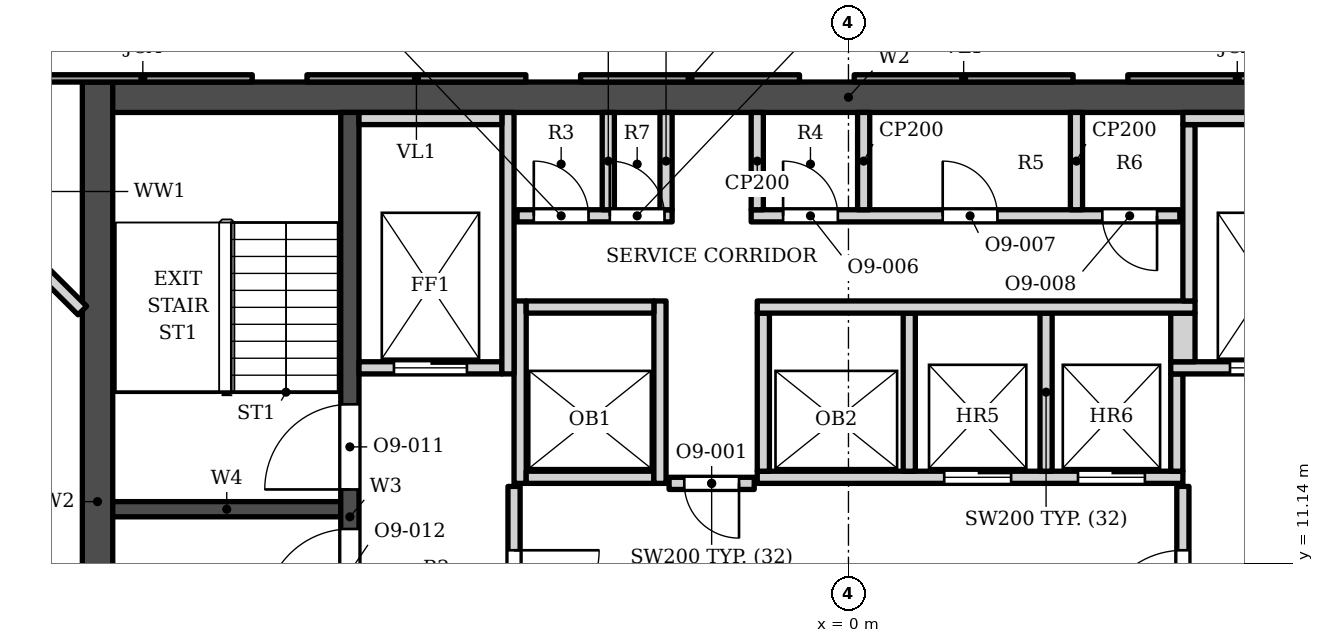
"""IFC4 building model, lengths in metres.
Left out: names, types, materials, properties, quantities, classifications, styles, units other than length and angle.
Written with IfcOpenShell. Run it as: python <this file> out.ifc"""

import sys

from ifc_helpers import new_model, si_unit, direction, frame, frame_2d, origin, place, context, subcontext, project, spatial, polyline, rectangle, outline, extrude, element, fill, save


model = new_model("IFC4")
c1 = context("Model", 3, precision=1e-05, world=origin(), true_north=direction((0.0, 1.0)))
c2 = subcontext(c1, "Body", "Model", "MODEL_VIEW")
j1 = project(units=[si_unit("LENGTHUNIT", "METRE"), si_unit("PLANEANGLEUNIT", "RADIAN")], contexts=[c1])
p1 = place(None, origin())
s1 = spatial("IfcSite", under=j1, at=p1, CompositionType="ELEMENT")
p2 = place(p1, origin())
s2 = spatial("IfcBuilding", under=s1, at=p2, CompositionType="ELEMENT")
p3 = place(p2, frame((0.0, 0.0, 248.2)))
s3 = spatial("IfcBuildingStorey", under=s2, at=p3, CompositionType="ELEMENT", Elevation=248.2)
p4 = place(p3, frame((-12.1, 18.802, 0.0), z_axis=(0.0, 0.0, 1.0), x_axis=(1.0, 0.0, 0.0)))
e1 = element("IfcWall", 1, at=p4, inside=s3, PredefinedType="SHEAR", context=c2, shape_type="SweptSolid", body=[
    extrude(rectangle(XDim=24.2, YDim=0.5, at=frame_2d((12.1, 0.0))), origin(), (0.0, 0.0, 1.0), 3.9),
])
p5 = place(p3, frame((-12.35, 5.253, 0.0), z_axis=(0.0, 0.0, 1.0), x_axis=(0.0, 1.0, 0.0)))
e2 = element("IfcWall", 2, at=p5, inside=s3, PredefinedType="SHEAR", context=c2, shape_type="SweptSolid", body=[
    extrude(rectangle(XDim=13.8, YDim=0.5, at=frame_2d((6.9, 0.0))), origin(), (0.0, 0.0, 1.0), 3.9),
])
p6 = place(p3, frame((-8.2, 5.253, 0.0), z_axis=(0.0, 0.0, 1.0), x_axis=(0.0, 1.0, 0.0)))
e3 = element("IfcWall", 3, at=p6, inside=s3, PredefinedType="SHEAR", context=c2, shape_type="SweptSolid", body=[
    extrude(rectangle(XDim=13.3, YDim=0.3, at=frame_2d((6.65, 0.0))), origin(), (0.0, 0.0, 1.0), 3.9),
])
p7 = place(p6, frame((7.1, 0.0, 0.0)))
e4 = element("IfcOpeningElement", 4, at=p7, cuts=e3, PredefinedType="OPENING", context=c2, shape_type="SweptSolid", body=[
    extrude(rectangle(XDim=1.4, YDim=2.1, at=frame_2d((0.7, 1.05))), frame((0.0, 0.16, 0.0), z_axis=(0.0, -1.0, 0.0), x_axis=(1.0, 0.0, 0.0)), (0.0, 0.0, 1.0), 0.32),
])
p8 = place(p6, frame((5.05, 0.0, 0.0)))
e5 = element("IfcOpeningElement", 5, at=p8, cuts=e3, PredefinedType="OPENING", context=c2, shape_type="SweptSolid", body=[
    extrude(rectangle(XDim=1.4, YDim=2.1, at=frame_2d((0.7, 1.05))), frame((0.0, 0.16, 0.0), z_axis=(0.0, -1.0, 0.0), x_axis=(1.0, 0.0, 0.0)), (0.0, 0.0, 1.0), 0.32),
])
p9 = place(p3, frame((-12.1, 12.028, 0.0), z_axis=(0.0, 0.0, 1.0), x_axis=(1.0, 0.0, 0.0)))
e6 = element("IfcWall", 6, at=p9, inside=s3, PredefinedType="SHEAR", context=c2, shape_type="SweptSolid", body=[
    extrude(rectangle(XDim=3.75, YDim=0.25, at=frame_2d((1.875, 0.0))), origin(), (0.0, 0.0, 1.0), 3.9),
])
p10 = place(p3, origin())
e7 = element("IfcWall", 7, at=p10, inside=s3, PredefinedType="SOLIDWALL", context=c2, shape_type="SweptSolid", body=[
    extrude(outline(polyline([(4.594, 19.173), (4.594, 19.052), (8.195, 19.052), (8.195, 19.173), (4.594, 19.173)])), origin(), (0.0, 0.0, 1.0), 3.0),
])
p11 = place(p3, origin())
e8 = element("IfcWall", 8, at=p11, inside=s3, PredefinedType="ELEMENTEDWALL", context=c2, shape_type="SweptSolid", body=[
    extrude(outline(polyline([(0.094, 19.173), (0.094, 19.052), (3.695, 19.052), (3.695, 19.173), (0.094, 19.173)])), origin(), (0.0, 0.0, 1.0), 3.0),
])
p12 = place(p3, origin())
e9 = element("IfcWall", 9, at=p12, inside=s3, PredefinedType="SOLIDWALL", context=c2, shape_type="SweptSolid", body=[
    extrude(outline(polyline([(-4.406, 19.173), (-4.406, 19.052), (-0.805, 19.052), (-0.805, 19.173), (-4.406, 19.173)])), origin(), (0.0, 0.0, 1.0), 3.0),
])
p13 = place(p3, origin())
e10 = element("IfcWall", 10, at=p13, inside=s3, PredefinedType="ELEMENTEDWALL", context=c2, shape_type="SweptSolid", body=[
    extrude(outline(polyline([(-8.906, 19.173), (-8.906, 19.052), (-5.305, 19.052), (-5.305, 19.173), (-8.906, 19.173)])), origin(), (0.0, 0.0, 1.0), 3.0),
])
p14 = place(p3, origin())
e11 = element("IfcWall", 11, at=p14, inside=s3, PredefinedType="SOLIDWALL", context=c2, shape_type="SweptSolid", body=[
    extrude(outline(polyline([(-13.405, 19.173), (-13.405, 19.052), (-9.805, 19.052), (-9.805, 19.173), (-13.405, 19.173)])), origin(), (0.0, 0.0, 1.0), 3.0),
])
p15 = place(p3, frame((-5.5, 9.103, 0.0), z_axis=(0.0, 0.0, 1.0), x_axis=(0.0, 1.0, 0.0)))
e12 = element("IfcWall", 12, at=p15, inside=s3, PredefinedType="SOLIDWALL", context=c2, shape_type="SweptSolid", body=[
    extrude(rectangle(XDim=3.3, YDim=0.2, at=frame_2d((1.65, 0.0))), origin(), (0.0, 0.0, 1.0), 3.73),
])
p16 = place(p15, frame((0.85, 0.0, 0.0)))
e13 = element("IfcOpeningElement", 13, at=p16, cuts=e12, PredefinedType="OPENING", context=c2, shape_type="SweptSolid", body=[
    extrude(rectangle(XDim=1.4, YDim=2.1, at=frame_2d((0.7, 1.05))), frame((0.0, 0.11, 0.0), z_axis=(0.0, -1.0, 0.0), x_axis=(1.0, 0.0, 0.0)), (0.0, 0.0, 1.0), 0.22),
])
p17 = place(p3, frame((5.5, 9.103, 0.0), z_axis=(0.0, 0.0, 1.0), x_axis=(0.0, 1.0, 0.0)))
e14 = element("IfcWall", 14, at=p17, inside=s3, PredefinedType="SOLIDWALL", context=c2, shape_type="SweptSolid", body=[
    extrude(rectangle(XDim=3.3, YDim=0.2, at=frame_2d((1.65, 0.0))), origin(), (0.0, 0.0, 1.0), 3.73),
])
p18 = place(p17, frame((0.85, 0.0, 0.0)))
e15 = element("IfcOpeningElement", 15, at=p18, cuts=e14, PredefinedType="OPENING", context=c2, shape_type="SweptSolid", body=[
    extrude(rectangle(XDim=1.4, YDim=2.1, at=frame_2d((0.7, 1.05))), frame((0.0, 0.11, 0.0), z_axis=(0.0, -1.0, 0.0), x_axis=(1.0, 0.0, 0.0)), (0.0, 0.0, 1.0), 0.22),
])
p19 = place(p3, frame((-2.95, 12.453, 0.0), z_axis=(0.0, 0.0, 1.0), x_axis=(1.0, 0.0, 0.0)))
e16 = element("IfcWall", 16, at=p19, inside=s3, PredefinedType="SOLIDWALL", context=c2, shape_type="SweptSolid", body=[
    extrude(rectangle(XDim=1.4, YDim=0.2, at=frame_2d((0.7, 0.0))), origin(), (0.0, 0.0, 1.0), 3.73),
])
p20 = place(p19, frame((0.25, 0.0, 0.0)))
e17 = element("IfcOpeningElement", 17, at=p20, cuts=e16, PredefinedType="OPENING", context=c2, shape_type="SweptSolid", body=[
    extrude(rectangle(XDim=0.9, YDim=2.1, at=frame_2d((0.45, 1.05))), frame((0.0, 0.11, 0.0), z_axis=(0.0, -1.0, 0.0), x_axis=(1.0, 0.0, 0.0)), (0.0, 0.0, 1.0), 0.22),
])
p21 = place(p3, frame((-5.4, 12.453, 0.0), z_axis=(0.0, 0.0, 1.0), x_axis=(0.0, 1.0, 0.0)))
e18 = element("IfcWall", 18, at=p21, inside=s3, PredefinedType="SOLIDWALL", context=c2, shape_type="SweptSolid", body=[
    extrude(rectangle(XDim=3.0, YDim=0.2, at=frame_2d((1.5, 0.0))), origin(), (0.0, 0.0, 1.0), 3.73),
])
p22 = place(p3, frame((-5.3, 12.552, 0.0), z_axis=(0.0, 0.0, 1.0), x_axis=(1.0, 0.0, 0.0)))
e19 = element("IfcWall", 19, at=p22, inside=s3, PredefinedType="SOLIDWALL", context=c2, shape_type="SweptSolid", body=[
    extrude(rectangle(XDim=2.1, YDim=0.2, at=frame_2d((1.05, 0.0))), origin(), (0.0, 0.0, 1.0), 3.73),
])
p23 = place(p3, frame((-3.1, 12.453, 0.0), z_axis=(0.0, 0.0, 1.0), x_axis=(0.0, 1.0, 0.0)))
e20 = element("IfcWall", 20, at=p23, inside=s3, PredefinedType="SOLIDWALL", context=c2, shape_type="SweptSolid", body=[
    extrude(rectangle(XDim=3.0, YDim=0.2, at=frame_2d((1.5, 0.0))), origin(), (0.0, 0.0, 1.0), 3.73),
])
p24 = place(p3, frame((-1.5, 12.552, 0.0), z_axis=(0.0, 0.0, 1.0), x_axis=(1.0, 0.0, 0.0)))
e21 = element("IfcWall", 21, at=p24, inside=s3, PredefinedType="SOLIDWALL", context=c2, shape_type="SweptSolid", body=[
    extrude(rectangle(XDim=7.0, YDim=0.2, at=frame_2d((3.5, 0.0))), origin(), (0.0, 0.0, 1.0), 3.73),
])
p25 = place(p24, frame((3.075, 0.0, 0.0)))
e22 = element("IfcOpeningElement", 22, at=p25, cuts=e21, PredefinedType="OPENING", context=c2, shape_type="SweptSolid", body=[
    extrude(rectangle(XDim=1.1, YDim=2.1, at=frame_2d((0.55, 1.05))), frame((0.0, 0.11, 0.0), z_axis=(0.0, -1.0, 0.0), x_axis=(1.0, 0.0, 0.0)), (0.0, 0.0, 1.0), 0.22),
])
p26 = place(p24, frame((5.275, 0.0, 0.0)))
e23 = element("IfcOpeningElement", 23, at=p26, cuts=e21, PredefinedType="OPENING", context=c2, shape_type="SweptSolid", body=[
    extrude(rectangle(XDim=1.1, YDim=2.1, at=frame_2d((0.55, 1.05))), frame((0.0, 0.11, 0.0), z_axis=(0.0, -1.0, 0.0), x_axis=(1.0, 0.0, 0.0)), (0.0, 0.0, 1.0), 0.22),
])
for number, where, z_axis, x_axis in (
    (24, (-1.4, 12.653, 0.0), (0.0, 0.0, 1.0), (0.0, 1.0, 0.0)),
    (25, (1.0, 12.653, 0.0), (0.0, 0.0, 1.0), (0.0, 1.0, 0.0)),
    (26, (3.25, 12.653, 0.0), (0.0, 0.0, 1.0), (0.0, 1.0, 0.0)),
):
    element("IfcWall", number, at=place(p3, frame(where, z_axis=z_axis, x_axis=x_axis)), inside=s3, PredefinedType="SOLIDWALL", context=c2, shape_type="SweptSolid", body=[
        extrude(rectangle(XDim=2.6, YDim=0.2, at=frame_2d((1.3, 0.0))), origin(), (0.0, 0.0, 1.0), 3.73),
    ])
p27 = place(p3, frame((5.4, 12.653, 0.0), z_axis=(0.0, 0.0, 1.0), x_axis=(0.0, 1.0, 0.0)))
e27 = element("IfcWall", 27, at=p27, inside=s3, PredefinedType="SOLIDWALL", context=c2, shape_type="SweptSolid", body=[
    extrude(rectangle(XDim=1.6, YDim=0.2, at=frame_2d((0.8, 0.0))), origin(), (0.0, 0.0, 1.0), 3.73),
])
p28 = place(p3, frame((-8.05, 14.353, 0.0), z_axis=(0.0, 0.0, 1.0), x_axis=(1.0, 0.0, 0.0)))
e28 = element("IfcWall", 28, at=p28, inside=s3, PredefinedType="SOLIDWALL", context=c2, shape_type="SweptSolid", body=[
    extrude(rectangle(XDim=2.35, YDim=0.2, at=frame_2d((1.175, 0.0))), origin(), (0.0, 0.0, 1.0), 3.73),
])
p29 = place(p28, frame((0.575, 0.0, 0.0)))
e29 = element("IfcOpeningElement", 29, at=p29, cuts=e28, PredefinedType="OPENING", context=c2, shape_type="SweptSolid", body=[
    extrude(rectangle(XDim=1.2, YDim=2.1, at=frame_2d((0.6, 1.05))), frame((0.0, 0.11, 0.0), z_axis=(0.0, -1.0, 0.0), x_axis=(1.0, 0.0, 0.0)), (0.0, 0.0, 1.0), 0.22),
])
p30 = place(p3, frame((-5.6, 14.253, 0.0), z_axis=(0.0, 0.0, 1.0), x_axis=(0.0, 1.0, 0.0)))
e30 = element("IfcWall", 30, at=p30, inside=s3, PredefinedType="SOLIDWALL", context=c2, shape_type="SweptSolid", body=[
    extrude(rectangle(XDim=4.3, YDim=0.2, at=frame_2d((2.15, 0.0))), origin(), (0.0, 0.0, 1.0), 3.73),
])
p31 = place(p3, frame((5.3, 14.353, 0.0), z_axis=(0.0, 0.0, 1.0), x_axis=(1.0, 0.0, 0.0)))
e31 = element("IfcWall", 31, at=p31, inside=s3, PredefinedType="SOLIDWALL", context=c2, shape_type="SweptSolid", body=[
    extrude(rectangle(XDim=2.75, YDim=0.2, at=frame_2d((1.375, 0.0))), origin(), (0.0, 0.0, 1.0), 3.73),
])
p32 = place(p31, frame((0.975, 0.0, 0.0)))
e32 = element("IfcOpeningElement", 32, at=p32, cuts=e31, PredefinedType="OPENING", context=c2, shape_type="SweptSolid", body=[
    extrude(rectangle(XDim=1.2, YDim=2.1, at=frame_2d((0.6, 1.05))), frame((0.0, 0.11, 0.0), z_axis=(0.0, -1.0, 0.0), x_axis=(1.0, 0.0, 0.0)), (0.0, 0.0, 1.0), 0.22),
])
p33 = place(p3, frame((5.5, 14.453, 0.0), z_axis=(0.0, 0.0, 1.0), x_axis=(0.0, 1.0, 0.0)))
e33 = element("IfcWall", 33, at=p33, inside=s3, PredefinedType="SOLIDWALL", context=c2, shape_type="SweptSolid", body=[
    extrude(rectangle(XDim=0.8, YDim=0.4, at=frame_2d((0.4, 0.0))), origin(), (0.0, 0.0, 1.0), 3.73),
])
p34 = place(p3, frame((-5.3, 15.353, 0.0), z_axis=(0.0, 0.0, 1.0), x_axis=(1.0, 0.0, 0.0)))
e34 = element("IfcWall", 34, at=p34, inside=s3, PredefinedType="SOLIDWALL", context=c2, shape_type="SweptSolid", body=[
    extrude(rectangle(XDim=2.1, YDim=0.2, at=frame_2d((1.05, 0.0))), origin(), (0.0, 0.0, 1.0), 3.73),
])
p35 = place(p3, frame((-1.5, 15.353, 0.0), z_axis=(0.0, 0.0, 1.0), x_axis=(1.0, 0.0, 0.0)))
e35 = element("IfcWall", 35, at=p35, inside=s3, PredefinedType="SOLIDWALL", context=c2, shape_type="SweptSolid", body=[
    extrude(rectangle(XDim=7.2, YDim=0.2, at=frame_2d((3.6, 0.0))), origin(), (0.0, 0.0, 1.0), 3.73),
])
p36 = place(p3, frame((5.6, 15.453, 0.0), z_axis=(0.0, 0.0, 1.0), x_axis=(0.0, 1.0, 0.0)))
e36 = element("IfcWall", 36, at=p36, inside=s3, PredefinedType="SOLIDWALL", context=c2, shape_type="SweptSolid", body=[
    extrude(rectangle(XDim=2.9, YDim=0.2, at=frame_2d((1.45, 0.0))), origin(), (0.0, 0.0, 1.0), 3.73),
])
p37 = place(p3, frame((-5.45, 16.853, 0.0), z_axis=(0.0, 0.0, 1.0), x_axis=(1.0, 0.0, 0.0)))
e37 = element("IfcWall", 37, at=p37, inside=s3, PredefinedType="SOLIDWALL", context=c2, shape_type="SweptSolid", body=[
    extrude(rectangle(XDim=2.55, YDim=0.2, at=frame_2d((1.275, 0.0))), origin(), (0.0, 0.0, 1.0), 3.73),
])
p38 = place(p37, frame((0.275, 0.0, 0.0)))
e38 = element("IfcOpeningElement", 38, at=p38, cuts=e37, PredefinedType="OPENING", context=c2, shape_type="SweptSolid", body=[
    extrude(rectangle(XDim=0.9, YDim=2.1, at=frame_2d((0.45, 1.05))), frame((0.0, 0.11, 0.0), z_axis=(0.0, -1.0, 0.0), x_axis=(1.0, 0.0, 0.0)), (0.0, 0.0, 1.0), 0.22),
])
p39 = place(p37, frame((1.525, 0.0, 0.0)))
e39 = element("IfcOpeningElement", 39, at=p39, cuts=e37, PredefinedType="OPENING", context=c2, shape_type="SweptSolid", body=[
    extrude(rectangle(XDim=0.9, YDim=2.1, at=frame_2d((0.45, 1.05))), frame((0.0, 0.11, 0.0), z_axis=(0.0, -1.0, 0.0), x_axis=(1.0, 0.0, 0.0)), (0.0, 0.0, 1.0), 0.22),
])
p40 = place(p3, frame((-1.6, 16.853, 0.0), z_axis=(0.0, 0.0, 1.0), x_axis=(1.0, 0.0, 0.0)))
e40 = element("IfcWall", 40, at=p40, inside=s3, PredefinedType="SOLIDWALL", context=c2, shape_type="SweptSolid", body=[
    extrude(rectangle(XDim=7.05, YDim=0.2, at=frame_2d((3.525, 0.0))), origin(), (0.0, 0.0, 1.0), 3.73),
])
p41 = place(p40, frame((0.525, 0.0, 0.0)))
e41 = element("IfcOpeningElement", 41, at=p41, cuts=e40, PredefinedType="OPENING", context=c2, shape_type="SweptSolid", body=[
    extrude(rectangle(XDim=0.9, YDim=2.1, at=frame_2d((0.45, 1.05))), frame((0.0, 0.11, 0.0), z_axis=(0.0, -1.0, 0.0), x_axis=(1.0, 0.0, 0.0)), (0.0, 0.0, 1.0), 0.22),
])
p42 = place(p40, frame((3.15, 0.0, 0.0)))
e42 = element("IfcOpeningElement", 42, at=p42, cuts=e40, PredefinedType="OPENING", context=c2, shape_type="SweptSolid", body=[
    extrude(rectangle(XDim=0.9, YDim=2.1, at=frame_2d((0.45, 1.05))), frame((0.0, 0.11, 0.0), z_axis=(0.0, -1.0, 0.0), x_axis=(1.0, 0.0, 0.0)), (0.0, 0.0, 1.0), 0.22),
])
p43 = place(p40, frame((5.775, 0.0, 0.0)))
e43 = element("IfcOpeningElement", 43, at=p43, cuts=e40, PredefinedType="OPENING", context=c2, shape_type="SweptSolid", body=[
    extrude(rectangle(XDim=0.9, YDim=2.1, at=frame_2d((0.45, 1.05))), frame((0.0, 0.11, 0.0), z_axis=(0.0, -1.0, 0.0), x_axis=(1.0, 0.0, 0.0)), (0.0, 0.0, 1.0), 0.22),
])
for number, where, z_axis, x_axis in (
    (44, (-3.95, 16.953, 0.0), (0.0, 0.0, 1.0), (0.0, 1.0, 0.0)),
    (45, (-3.0, 16.953, 0.0), (0.0, 0.0, 1.0), (0.0, 1.0, 0.0)),
    (46, (-1.5, 16.953, 0.0), (0.0, 0.0, 1.0), (0.0, 1.0, 0.0)),
    (47, (0.25, 16.953, 0.0), (0.0, 0.0, 1.0), (0.0, 1.0, 0.0)),
    (48, (3.75, 16.953, 0.0), (0.0, 0.0, 1.0), (0.0, 1.0, 0.0)),
):
    element("IfcWall", number, at=place(p3, frame(where, z_axis=z_axis, x_axis=x_axis)), inside=s3, PredefinedType="PARTITIONING", context=c2, shape_type="SweptSolid", body=[
        extrude(rectangle(XDim=1.6, YDim=0.2, at=frame_2d((0.8, 0.0))), origin(), (0.0, 0.0, 1.0), 3.73),
    ])
p44 = place(p3, frame((-8.05, 18.453, 0.0), z_axis=(0.0, 0.0, 1.0), x_axis=(1.0, 0.0, 0.0)))
e49 = element("IfcWall", 49, at=p44, inside=s3, PredefinedType="SOLIDWALL", context=c2, shape_type="SweptSolid", body=[
    extrude(rectangle(XDim=2.35, YDim=0.2, at=frame_2d((1.175, 0.0))), origin(), (0.0, 0.0, 1.0), 3.73),
])
p45 = place(p3, frame((5.5, 18.453, 0.0), z_axis=(0.0, 0.0, 1.0), x_axis=(1.0, 0.0, 0.0)))
e50 = element("IfcWall", 50, at=p45, inside=s3, PredefinedType="SOLIDWALL", context=c2, shape_type="SweptSolid", body=[
    extrude(rectangle(XDim=2.55, YDim=0.2, at=frame_2d((1.275, 0.0))), origin(), (0.0, 0.0, 1.0), 3.73),
])
p46 = place(p3, frame((-13.26, 15.953, 0.0), z_axis=(0.0, 0.0, 1.0), x_axis=(0.708285399161, -0.705926195389, 0.0)))
e51 = element("IfcWall", 51, at=p46, inside=s3, PredefinedType="PARTITIONING", context=c2, shape_type="SweptSolid", body=[
    extrude(rectangle(XDim=0.931, YDim=0.2, at=frame_2d((0.466, 0.0))), origin(), (0.0, 0.0, 1.0), 3.73),
])
p47 = place(p25, origin())
e52 = element("IfcDoor", 52, at=p47, inside=s3, OperationType="DOUBLE_DOOR_SLIDING", PredefinedType="DOOR", context=c2, shape_type="SweptSolid", body=[
    extrude(rectangle(XDim=1.1, YDim=2.1, at=frame_2d((0.55, 1.05))), frame((0.0, 0.025, 0.0), z_axis=(0.0, -1.0, 0.0), x_axis=(1.0, 0.0, 0.0)), (0.0, 0.0, 1.0), 0.05),
])
fill(e22, e52)
p48 = place(p26, origin())
e53 = element("IfcDoor", 53, at=p48, inside=s3, OperationType="DOUBLE_DOOR_SLIDING", PredefinedType="DOOR", context=c2, shape_type="SweptSolid", body=[
    extrude(rectangle(XDim=1.1, YDim=2.1, at=frame_2d((0.55, 1.05))), frame((0.0, 0.025, 0.0), z_axis=(0.0, -1.0, 0.0), x_axis=(1.0, 0.0, 0.0)), (0.0, 0.0, 1.0), 0.05),
])
fill(e23, e53)
p49 = place(p29, origin())
e54 = element("IfcDoor", 54, at=p49, inside=s3, OperationType="DOUBLE_DOOR_SLIDING", PredefinedType="DOOR", context=c2, shape_type="SweptSolid", body=[
    extrude(rectangle(XDim=1.2, YDim=2.1, at=frame_2d((0.6, 1.05))), frame((0.0, 0.025, 0.0), z_axis=(0.0, -1.0, 0.0), x_axis=(1.0, 0.0, 0.0)), (0.0, 0.0, 1.0), 0.05),
])
fill(e29, e54)
p50 = place(p32, origin())
e55 = element("IfcDoor", 55, at=p50, inside=s3, OperationType="DOUBLE_DOOR_SLIDING", PredefinedType="DOOR", context=c2, shape_type="SweptSolid", body=[
    extrude(rectangle(XDim=1.2, YDim=2.1, at=frame_2d((0.6, 1.05))), frame((0.0, 0.025, 0.0), z_axis=(0.0, -1.0, 0.0), x_axis=(1.0, 0.0, 0.0)), (0.0, 0.0, 1.0), 0.05),
])
fill(e32, e55)
p51 = place(p7, origin())
e56 = element("IfcDoor", 56, at=p51, inside=s3, OperationType="SINGLE_SWING_LEFT", PredefinedType="DOOR", context=c2, shape_type="SweptSolid", body=[
    extrude(rectangle(XDim=1.4, YDim=2.1, at=frame_2d((0.7, 1.05))), frame((0.0, 0.025, 0.0), z_axis=(0.0, -1.0, 0.0), x_axis=(1.0, 0.0, 0.0)), (0.0, 0.0, 1.0), 0.05),
])
fill(e4, e56)
p52 = place(p8, origin())
e57 = element("IfcDoor", 57, at=p52, inside=s3, OperationType="SINGLE_SWING_LEFT", PredefinedType="DOOR", context=c2, shape_type="SweptSolid", body=[
    extrude(rectangle(XDim=1.4, YDim=2.1, at=frame_2d((0.7, 1.05))), frame((0.0, 0.025, 0.0), z_axis=(0.0, -1.0, 0.0), x_axis=(1.0, 0.0, 0.0)), (0.0, 0.0, 1.0), 0.05),
])
fill(e5, e57)
p53 = place(p20, origin())
e58 = element("IfcDoor", 58, at=p53, inside=s3, OperationType="SINGLE_SWING_RIGHT", PredefinedType="DOOR", context=c2, shape_type="SweptSolid", body=[
    extrude(rectangle(XDim=0.9, YDim=2.1, at=frame_2d((0.45, 1.05))), frame((0.0, 0.025, 0.0), z_axis=(0.0, -1.0, 0.0), x_axis=(1.0, 0.0, 0.0)), (0.0, 0.0, 1.0), 0.05),
])
fill(e17, e58)
p54 = place(p16, origin())
e59 = element("IfcDoor", 59, at=p54, inside=s3, OperationType="SINGLE_SWING_RIGHT", PredefinedType="DOOR", context=c2, shape_type="SweptSolid", body=[
    extrude(rectangle(XDim=1.4, YDim=2.1, at=frame_2d((0.7, 1.05))), frame((0.0, 0.025, 0.0), z_axis=(0.0, -1.0, 0.0), x_axis=(1.0, 0.0, 0.0)), (0.0, 0.0, 1.0), 0.05),
])
fill(e13, e59)
p55 = place(p18, origin())
e60 = element("IfcDoor", 60, at=p55, inside=s3, OperationType="SINGLE_SWING_LEFT", PredefinedType="DOOR", context=c2, shape_type="SweptSolid", body=[
    extrude(rectangle(XDim=1.4, YDim=2.1, at=frame_2d((0.7, 1.05))), frame((0.0, 0.025, 0.0), z_axis=(0.0, -1.0, 0.0), x_axis=(1.0, 0.0, 0.0)), (0.0, 0.0, 1.0), 0.05),
])
fill(e15, e60)
p56 = place(p38, origin())
e61 = element("IfcDoor", 61, at=p56, inside=s3, OperationType="SINGLE_SWING_LEFT", PredefinedType="DOOR", context=c2, shape_type="SweptSolid", body=[
    extrude(rectangle(XDim=0.9, YDim=2.1, at=frame_2d((0.45, 1.05))), frame((0.0, 0.025, 0.0), z_axis=(0.0, -1.0, 0.0), x_axis=(1.0, 0.0, 0.0)), (0.0, 0.0, 1.0), 0.05),
])
fill(e38, e61)
p57 = place(p39, origin())
e62 = element("IfcDoor", 62, at=p57, inside=s3, OperationType="SINGLE_SWING_LEFT", PredefinedType="DOOR", context=c2, shape_type="SweptSolid", body=[
    extrude(rectangle(XDim=0.9, YDim=2.1, at=frame_2d((0.45, 1.05))), frame((0.0, 0.025, 0.0), z_axis=(0.0, -1.0, 0.0), x_axis=(1.0, 0.0, 0.0)), (0.0, 0.0, 1.0), 0.05),
])
fill(e39, e62)
p58 = place(p41, origin())
e63 = element("IfcDoor", 63, at=p58, inside=s3, OperationType="SINGLE_SWING_LEFT", PredefinedType="DOOR", context=c2, shape_type="SweptSolid", body=[
    extrude(rectangle(XDim=0.9, YDim=2.1, at=frame_2d((0.45, 1.05))), frame((0.0, 0.025, 0.0), z_axis=(0.0, -1.0, 0.0), x_axis=(1.0, 0.0, 0.0)), (0.0, 0.0, 1.0), 0.05),
])
fill(e41, e63)
p59 = place(p42, origin())
e64 = element("IfcDoor", 64, at=p59, inside=s3, OperationType="SINGLE_SWING_LEFT", PredefinedType="DOOR", context=c2, shape_type="SweptSolid", body=[
    extrude(rectangle(XDim=0.9, YDim=2.1, at=frame_2d((0.45, 1.05))), frame((0.0, 0.025, 0.0), z_axis=(0.0, -1.0, 0.0), x_axis=(1.0, 0.0, 0.0)), (0.0, 0.0, 1.0), 0.05),
])
fill(e42, e64)
p60 = place(p43, origin())
e65 = element("IfcDoor", 65, at=p60, inside=s3, OperationType="SINGLE_SWING_RIGHT", PredefinedType="DOOR", context=c2, shape_type="SweptSolid", body=[
    extrude(rectangle(XDim=0.9, YDim=2.1, at=frame_2d((0.45, 1.05))), frame((0.0, 0.025, 0.0), z_axis=(0.0, -1.0, 0.0), x_axis=(1.0, 0.0, 0.0)), (0.0, 0.0, 1.0), 0.05),
])
fill(e43, e65)
save(model, sys.argv[1])
